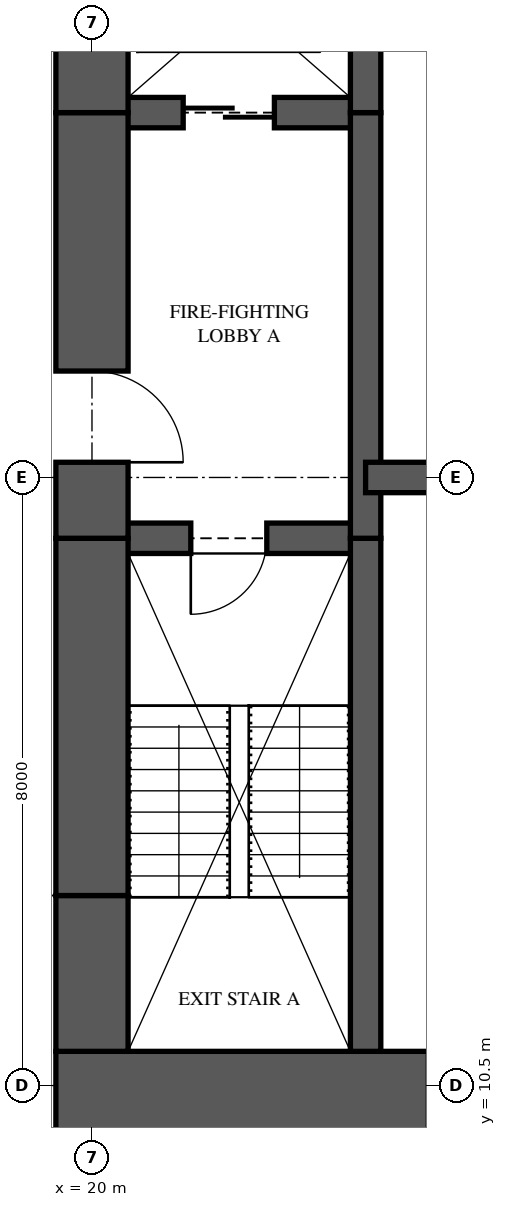
"""IFC4 building model, lengths in metres.
Left out: names, types, materials, properties, quantities, classifications, styles, units other than length and angle.
Written with IfcOpenShell. Run it as: python <this file> out.ifc"""

import sys

from ifc_helpers import new_model, si_unit, direction, frame, frame_2d, origin, place, context, subcontext, project, spatial, rectangle, extrude, element, fill, save


model = new_model("IFC4")
c1 = context("Model", 3, precision=1e-05, world=origin(), true_north=direction((0.0, 1.0)))
c2 = subcontext(c1, "Body", "Model", "MODEL_VIEW")
j1 = project(units=[si_unit("LENGTHUNIT", "METRE"), si_unit("PLANEANGLEUNIT", "RADIAN")], contexts=[c1])
p1 = place(None, origin())
s1 = spatial("IfcSite", under=j1, at=p1, CompositionType="ELEMENT")
p2 = place(p1, origin())
s2 = spatial("IfcBuilding", under=s1, at=p2, CompositionType="ELEMENT")
p3 = place(p2, frame((0.0, 0.0, 37.75)))
s3 = spatial("IfcBuildingStorey", under=s2, at=p3, CompositionType="ELEMENT", Elevation=37.75)
p4 = place(p3, frame((19.525, 10.125, 0.0), z_axis=(0.0, 0.0, 1.0), x_axis=(1.0, 0.0, 0.0)))
e1 = element("IfcWall", 1, at=p4, inside=s3, PredefinedType="SHEAR", context=c2, shape_type="SweptSolid", body=[
    extrude(rectangle(XDim=6.475, YDim=1.65, at=frame_2d((3.238, 0.0))), origin(), (0.0, 0.0, 1.0), 3.35),
])
p5 = place(p4, frame((4.9, 0.0, 0.0)))
e2 = element("IfcOpeningElement", 2, at=p5, cuts=e1, PredefinedType="OPENING", context=c2, shape_type="SweptSolid", body=[
    extrude(rectangle(XDim=0.75, YDim=2.1, at=frame_2d((0.375, 1.05))), frame((0.0, 0.835, 0.0), z_axis=(0.0, -1.0, 0.0), x_axis=(1.0, 0.0, 0.0)), (0.0, 0.0, 1.0), 1.67),
])
p6 = place(p3, frame((20.0, 26.05, 0.0), z_axis=(0.0, 0.0, 1.0), x_axis=(0.0, -1.0, 0.0)))
e3 = element("IfcWall", 3, at=p6, inside=s3, PredefinedType="SHEAR", context=c2, shape_type="SweptSolid", body=[
    extrude(rectangle(XDim=2.75, YDim=0.95, at=frame_2d((1.375, 0.0))), origin(), (0.0, 0.0, 1.0), 3.35),
])
p7 = place(p3, frame((20.0, 23.3, 0.0), z_axis=(0.0, 0.0, 1.0), x_axis=(0.0, -1.0, 0.0)))
e4 = element("IfcWall", 4, at=p7, inside=s3, PredefinedType="SHEAR", context=c2, shape_type="SweptSolid", body=[
    extrude(rectangle(XDim=5.6, YDim=0.95, at=frame_2d((2.8, 0.0))), origin(), (0.0, 0.0, 1.0), 3.35),
])
p8 = place(p7, frame((3.4, 0.0, 0.0)))
e5 = element("IfcOpeningElement", 5, at=p8, cuts=e4, PredefinedType="OPENING", context=c2, shape_type="SweptSolid", body=[
    extrude(rectangle(XDim=1.2, YDim=2.2, at=frame_2d((0.6, 1.1))), frame((0.0, 0.485, 0.0), z_axis=(0.0, -1.0, 0.0), x_axis=(1.0, 0.0, 0.0)), (0.0, 0.0, 1.0), 0.97),
])
p9 = place(p3, frame((20.0, 17.7, 0.0), z_axis=(0.0, 0.0, 1.0), x_axis=(0.0, -1.0, 0.0)))
e6 = element("IfcWall", 6, at=p9, inside=s3, PredefinedType="SHEAR", context=c2, shape_type="SweptSolid", body=[
    extrude(rectangle(XDim=4.7, YDim=0.95, at=frame_2d((2.35, 0.0))), origin(), (0.0, 0.0, 1.0), 3.35),
])
p10 = place(p3, frame((20.0, 13.0, 0.0), z_axis=(0.0, 0.0, 1.0), x_axis=(0.0, -1.0, 0.0)))
e7 = element("IfcWall", 7, at=p10, inside=s3, PredefinedType="SHEAR", context=c2, shape_type="SweptSolid", body=[
    extrude(rectangle(XDim=2.05, YDim=0.95, at=frame_2d((1.025, 0.0))), origin(), (0.0, 0.0, 1.0), 3.35),
])
p11 = place(p3, frame((23.6, 10.95, 0.0), z_axis=(0.0, 0.0, 1.0), x_axis=(0.0, 1.0, 0.0)))
e8 = element("IfcWall", 8, at=p11, inside=s3, PredefinedType="SHEAR", context=c2, shape_type="SweptSolid", body=[
    extrude(rectangle(XDim=6.75, YDim=0.4, at=frame_2d((3.375, 0.0))), origin(), (0.0, 0.0, 1.0), 3.35),
])
p12 = place(p3, frame((23.6, 17.7, 0.0), z_axis=(0.0, 0.0, 1.0), x_axis=(0.0, 1.0, 0.0)))
e9 = element("IfcWall", 9, at=p12, inside=s3, PredefinedType="SHEAR", context=c2, shape_type="SweptSolid", body=[
    extrude(rectangle(XDim=5.6, YDim=0.4, at=frame_2d((2.8, 0.0))), origin(), (0.0, 0.0, 1.0), 3.35),
])
p13 = place(p3, frame((23.6, 23.3, 0.0), z_axis=(0.0, 0.0, 1.0), x_axis=(0.0, 1.0, 0.0)))
e10 = element("IfcWall", 10, at=p13, inside=s3, PredefinedType="SHEAR", context=c2, shape_type="SweptSolid", body=[
    extrude(rectangle(XDim=2.75, YDim=0.4, at=frame_2d((1.375, 0.0))), origin(), (0.0, 0.0, 1.0), 3.35),
])
p14 = place(p3, frame((20.0, 17.7, 0.0), z_axis=(0.0, 0.0, 1.0), x_axis=(1.0, 0.0, 0.0)))
e11 = element("IfcWall", 11, at=p14, inside=s3, PredefinedType="SHEAR", context=c2, shape_type="SweptSolid", body=[
    extrude(rectangle(XDim=3.6, YDim=0.4, at=frame_2d((1.8, 0.0))), origin(), (0.0, 0.0, 1.0), 3.35),
])
p15 = place(p14, frame((1.3, 0.0, 0.0)))
e12 = element("IfcOpeningElement", 12, at=p15, cuts=e11, PredefinedType="OPENING", context=c2, shape_type="SweptSolid", body=[
    extrude(rectangle(XDim=1.0, YDim=2.1, at=frame_2d((0.5, 1.05))), frame((0.0, 0.21, 0.0), z_axis=(0.0, -1.0, 0.0), x_axis=(1.0, 0.0, 0.0)), (0.0, 0.0, 1.0), 0.42),
])
p16 = place(p3, frame((20.0, 23.3, 0.0), z_axis=(0.0, 0.0, 1.0), x_axis=(1.0, 0.0, 0.0)))
e13 = element("IfcWall", 13, at=p16, inside=s3, PredefinedType="SHEAR", context=c2, shape_type="SweptSolid", body=[
    extrude(rectangle(XDim=3.6, YDim=0.4, at=frame_2d((1.8, 0.0))), origin(), (0.0, 0.0, 1.0), 3.35),
])
p17 = place(p16, frame((1.2, 0.0, 0.0)))
e14 = element("IfcOpeningElement", 14, at=p17, cuts=e13, PredefinedType="OPENING", context=c2, shape_type="SweptSolid", body=[
    extrude(rectangle(XDim=1.2, YDim=2.1, at=frame_2d((0.6, 1.05))), frame((0.0, 0.21, 0.0), z_axis=(0.0, -1.0, 0.0), x_axis=(1.0, 0.0, 0.0)), (0.0, 0.0, 1.0), 0.42),
])
p18 = place(p3, frame((23.6, 18.5, 0.0), z_axis=(0.0, 0.0, 1.0), x_axis=(1.0, 0.0, 0.0)))
e15 = element("IfcWall", 15, at=p18, inside=s3, PredefinedType="SHEAR", context=c2, shape_type="SweptSolid", body=[
    extrude(rectangle(XDim=2.4, YDim=0.4, at=frame_2d((1.2, 0.0))), origin(), (0.0, 0.0, 1.0), 3.35),
])
p19 = place(p15, frame((1.0, 0.0, 0.0), z_axis=(0.0, 0.0, 1.0), x_axis=(-1.0, 0.0, 0.0)))
e16 = element("IfcDoor", 16, at=p19, inside=s3, OperationType="SINGLE_SWING_RIGHT", PredefinedType="DOOR", context=c2, shape_type="SweptSolid", body=[
    extrude(rectangle(XDim=1.0, YDim=2.1, at=frame_2d((0.5, 1.05))), frame((0.0, 0.025, 0.0), z_axis=(0.0, -1.0, 0.0), x_axis=(1.0, 0.0, 0.0)), (0.0, 0.0, 1.0), 0.05),
])
fill(e12, e16)
p20 = place(p8, origin())
e17 = element("IfcDoor", 17, at=p20, inside=s3, OperationType="SINGLE_SWING_RIGHT", PredefinedType="DOOR", context=c2, shape_type="SweptSolid", body=[
    extrude(rectangle(XDim=1.2, YDim=2.2, at=frame_2d((0.6, 1.1))), frame((0.0, 0.025, 0.0), z_axis=(0.0, -1.0, 0.0), x_axis=(1.0, 0.0, 0.0)), (0.0, 0.0, 1.0), 0.05),
])
fill(e5, e17)
p21 = place(p17, origin())
e18 = element("IfcDoor", 18, at=p21, inside=s3, OperationType="SLIDING_TO_LEFT", PredefinedType="DOOR", context=c2, shape_type="SweptSolid", body=[
    extrude(rectangle(XDim=1.2, YDim=2.1, at=frame_2d((0.6, 1.05))), frame((0.0, 0.025, 0.0), z_axis=(0.0, -1.0, 0.0), x_axis=(1.0, 0.0, 0.0)), (0.0, 0.0, 1.0), 0.05),
])
fill(e14, e18)
save(model, sys.argv[1])
